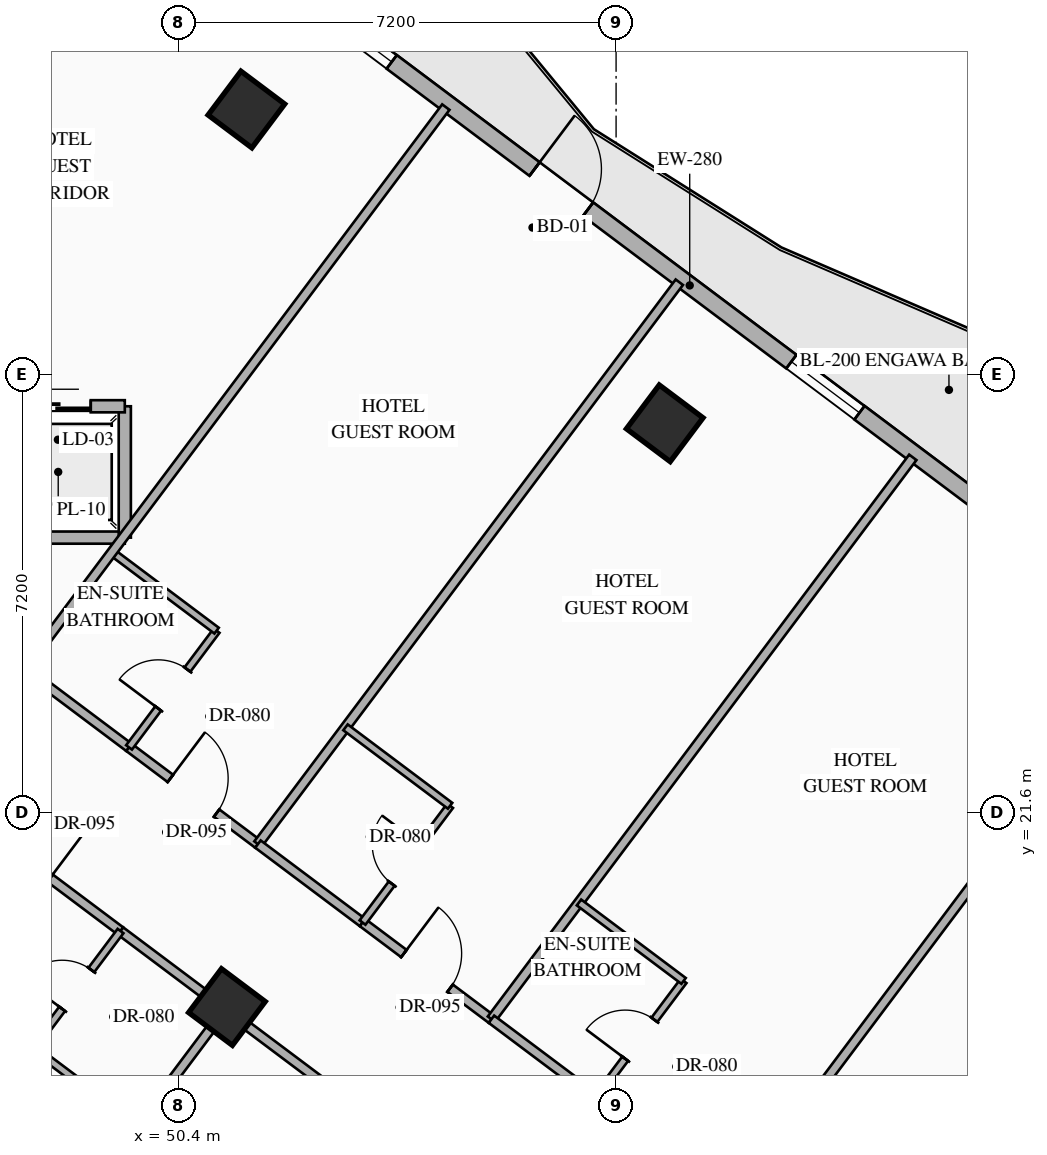
"""IFC4 building model, lengths in metres.
Left out: names, types, materials, properties, quantities, classifications, styles, units other than length and angle.
Written with IfcOpenShell. Run it as: python <this file> out.ifc"""

import sys

from ifc_helpers import new_model, si_unit, direction, frame, frame_2d, origin, origin_2d, place, context, subcontext, project, spatial, rectangle, hollow_rectangle, extrude, element, fill, save


model = new_model("IFC4")
c1 = context("Model", 3, precision=1e-05, world=origin(), true_north=direction((0.0, 1.0)))
c2 = subcontext(c1, "Body", "Model", "MODEL_VIEW")
j1 = project(units=[si_unit("LENGTHUNIT", "METRE"), si_unit("PLANEANGLEUNIT", "RADIAN")], contexts=[c1])
p1 = place(None, origin())
s1 = spatial("IfcSite", under=j1, at=p1, CompositionType="ELEMENT")
p2 = place(p1, origin())
s2 = spatial("IfcBuilding", under=s1, at=p2, CompositionType="ELEMENT")
p3 = place(p2, frame((0.0, 0.0, 74.6)))
s3 = spatial("IfcBuildingStorey", under=s2, at=p3, CompositionType="ELEMENT", Elevation=74.6)
for number, where, z_axis, x_axis in (
    (1, (51.52, 33.16, 0.0), (0.0, 0.0, 1.0), (0.8, -0.6, 0.0)),
    (2, (58.4, 28.0, 0.0), (0.0, 0.0, 1.0), (0.8, -0.6, 0.0)),
    (3, (51.2, 18.4, 0.0), (0.0, 0.0, 1.0), (0.8, -0.6, 0.0)),
):
    element("IfcColumn", number, at=place(p3, frame(where, z_axis=z_axis, x_axis=x_axis)), inside=s3, PredefinedType="COLUMN", context=c2, shape_type="SweptSolid", body=[
        extrude(hollow_rectangle(XDim=0.9, YDim=0.9, WallThickness=0.036, at=origin_2d()), origin(), (0.0, 0.0, 1.0), 3.35),
    ])
p4 = place(p3, frame((44.86, 40.73, 0.0), z_axis=(0.0, 0.0, 1.0), x_axis=(0.800006902154, -0.599990797017, 0.0)))
e4 = element("IfcWall", 4, at=p4, inside=s3, PredefinedType="STANDARD", context=c2, shape_type="SweptSolid", body=[
    extrude(rectangle(XDim=29.712, YDim=0.28, at=frame_2d((14.856, 0.0))), origin(), (0.0, 0.0, 1.0), 3.13),
])
p5 = place(p4, frame((14.249, 0.0, 0.0)))
e5 = element("IfcOpeningElement", 5, at=p5, cuts=e4, PredefinedType="OPENING", context=c2, shape_type="SweptSolid", body=[
    extrude(rectangle(XDim=1.1, YDim=2.2, at=frame_2d((0.55, 1.1))), frame((0.0, 0.15, 0.0), z_axis=(0.0, -1.0, 0.0), x_axis=(1.0, 0.0, 0.0)), (0.0, 0.0, 1.0), 0.3),
])
p6 = place(p4, frame((1.612, 0.0, 0.85)))
e6 = element("IfcOpeningElement", 6, at=p6, cuts=e4, PredefinedType="OPENING", context=c2, shape_type="SweptSolid", body=[
    extrude(rectangle(XDim=1.4, YDim=1.8, at=frame_2d((0.7, 0.9))), frame((0.0, 0.15, 0.0), z_axis=(0.0, -1.0, 0.0), x_axis=(1.0, 0.0, 0.0)), (0.0, 0.0, 1.0), 0.3),
])
p7 = place(p4, frame((5.667, 0.0, 0.85)))
e7 = element("IfcOpeningElement", 7, at=p7, cuts=e4, PredefinedType="OPENING", context=c2, shape_type="SweptSolid", body=[
    extrude(rectangle(XDim=1.4, YDim=1.8, at=frame_2d((0.7, 0.9))), frame((0.0, 0.15, 0.0), z_axis=(0.0, -1.0, 0.0), x_axis=(1.0, 0.0, 0.0)), (0.0, 0.0, 1.0), 0.3),
])
p8 = place(p4, frame((9.912, 0.0, 0.85)))
e8 = element("IfcOpeningElement", 8, at=p8, cuts=e4, PredefinedType="OPENING", context=c2, shape_type="SweptSolid", body=[
    extrude(rectangle(XDim=1.4, YDim=1.8, at=frame_2d((0.7, 0.9))), frame((0.0, 0.15, 0.0), z_axis=(0.0, -1.0, 0.0), x_axis=(1.0, 0.0, 0.0)), (0.0, 0.0, 1.0), 0.3),
])
p9 = place(p4, frame((19.528, 0.0, 0.85)))
e9 = element("IfcOpeningElement", 9, at=p9, cuts=e4, PredefinedType="OPENING", context=c2, shape_type="SweptSolid", body=[
    extrude(rectangle(XDim=1.4, YDim=1.8, at=frame_2d((0.7, 0.9))), frame((0.0, 0.15, 0.0), z_axis=(0.0, -1.0, 0.0), x_axis=(1.0, 0.0, 0.0)), (0.0, 0.0, 1.0), 0.3),
])
p10 = place(p4, frame((23.451, 0.0, 0.85)))
e10 = element("IfcOpeningElement", 10, at=p10, cuts=e4, PredefinedType="OPENING", context=c2, shape_type="SweptSolid", body=[
    extrude(rectangle(XDim=1.4, YDim=1.8, at=frame_2d((0.7, 0.9))), frame((0.0, 0.15, 0.0), z_axis=(0.0, -1.0, 0.0), x_axis=(1.0, 0.0, 0.0)), (0.0, 0.0, 1.0), 0.3),
])
p11 = place(p4, frame((27.852, 0.0, 0.85)))
e11 = element("IfcOpeningElement", 11, at=p11, cuts=e4, PredefinedType="OPENING", context=c2, shape_type="SweptSolid", body=[
    extrude(rectangle(XDim=1.4, YDim=1.8, at=frame_2d((0.7, 0.9))), frame((0.0, 0.15, 0.0), z_axis=(0.0, -1.0, 0.0), x_axis=(1.0, 0.0, 0.0)), (0.0, 0.0, 1.0), 0.3),
])
p12 = place(p3, frame((53.318, 2.487, 0.0), z_axis=(0.0, 0.0, 1.0), x_axis=(-0.800004174678, 0.599994433723, 0.0)))
e12 = element("IfcWall", 12, at=p12, inside=s3, PredefinedType="STANDARD", context=c2, shape_type="SweptSolid", body=[
    extrude(rectangle(XDim=35.089, YDim=0.28, at=frame_2d((17.544, 0.0))), origin(), (0.0, 0.0, 1.0), 3.13),
])
p13 = place(p12, frame((1.931, 0.0, 0.85)))
e13 = element("IfcOpeningElement", 13, at=p13, cuts=e12, PredefinedType="OPENING", context=c2, shape_type="SweptSolid", body=[
    extrude(rectangle(XDim=1.4, YDim=1.8, at=frame_2d((0.7, 0.9))), frame((0.0, 0.15, 0.0), z_axis=(0.0, -1.0, 0.0), x_axis=(1.0, 0.0, 0.0)), (0.0, 0.0, 1.0), 0.3),
])
p14 = place(p12, frame((6.819, 0.0, 0.85)))
e14 = element("IfcOpeningElement", 14, at=p14, cuts=e12, PredefinedType="OPENING", context=c2, shape_type="SweptSolid", body=[
    extrude(rectangle(XDim=1.4, YDim=1.8, at=frame_2d((0.7, 0.9))), frame((0.0, 0.15, 0.0), z_axis=(0.0, -1.0, 0.0), x_axis=(1.0, 0.0, 0.0)), (0.0, 0.0, 1.0), 0.3),
])
p15 = place(p12, frame((11.832, 0.0, 0.85)))
e15 = element("IfcOpeningElement", 15, at=p15, cuts=e12, PredefinedType="OPENING", context=c2, shape_type="SweptSolid", body=[
    extrude(rectangle(XDim=1.4, YDim=1.8, at=frame_2d((0.7, 0.9))), frame((0.0, 0.15, 0.0), z_axis=(0.0, -1.0, 0.0), x_axis=(1.0, 0.0, 0.0)), (0.0, 0.0, 1.0), 0.3),
])
p16 = place(p12, frame((17.647, 0.0, 0.85)))
e16 = element("IfcOpeningElement", 16, at=p16, cuts=e12, PredefinedType="OPENING", context=c2, shape_type="SweptSolid", body=[
    extrude(rectangle(XDim=1.4, YDim=1.8, at=frame_2d((0.7, 0.9))), frame((0.0, 0.15, 0.0), z_axis=(0.0, -1.0, 0.0), x_axis=(1.0, 0.0, 0.0)), (0.0, 0.0, 1.0), 0.3),
])
p17 = place(p12, frame((21.857, 0.0, 0.85)))
e17 = element("IfcOpeningElement", 17, at=p17, cuts=e12, PredefinedType="OPENING", context=c2, shape_type="SweptSolid", body=[
    extrude(rectangle(XDim=1.4, YDim=1.8, at=frame_2d((0.7, 0.9))), frame((0.0, 0.15, 0.0), z_axis=(0.0, -1.0, 0.0), x_axis=(1.0, 0.0, 0.0)), (0.0, 0.0, 1.0), 0.3),
])
p18 = place(p12, frame((26.87, 0.0, 0.85)))
e18 = element("IfcOpeningElement", 18, at=p18, cuts=e12, PredefinedType="OPENING", context=c2, shape_type="SweptSolid", body=[
    extrude(rectangle(XDim=1.4, YDim=1.8, at=frame_2d((0.7, 0.9))), frame((0.0, 0.15, 0.0), z_axis=(0.0, -1.0, 0.0), x_axis=(1.0, 0.0, 0.0)), (0.0, 0.0, 1.0), 0.3),
])
p19 = place(p12, frame((31.757, 0.0, 0.85)))
e19 = element("IfcOpeningElement", 19, at=p19, cuts=e12, PredefinedType="OPENING", context=c2, shape_type="SweptSolid", body=[
    extrude(rectangle(XDim=1.4, YDim=1.8, at=frame_2d((0.7, 0.9))), frame((0.0, 0.15, 0.0), z_axis=(0.0, -1.0, 0.0), x_axis=(1.0, 0.0, 0.0)), (0.0, 0.0, 1.0), 0.3),
])
p20 = place(p3, frame((45.12, 26.12, 0.0), z_axis=(0.0, 0.0, 1.0), x_axis=(1.0, 0.0, 0.0)))
e20 = element("IfcWall", 20, at=p20, inside=s3, PredefinedType="STANDARD", context=c2, shape_type="SweptSolid", body=[
    extrude(rectangle(XDim=4.4, YDim=0.2, at=frame_2d((2.2, 0.0))), origin(), (0.0, 0.0, 1.0), 3.13),
])
p21 = place(p3, frame((49.52, 26.12, 0.0), z_axis=(0.0, 0.0, 1.0), x_axis=(0.0, 1.0, 0.0)))
e21 = element("IfcWall", 21, at=p21, inside=s3, PredefinedType="STANDARD", context=c2, shape_type="SweptSolid", body=[
    extrude(rectangle(XDim=2.16, YDim=0.2, at=frame_2d((1.08, 0.0))), origin(), (0.0, 0.0, 1.0), 3.13),
])
p22 = place(p3, frame((45.12, 28.28, 0.0), z_axis=(0.0, 0.0, 1.0), x_axis=(1.0, 0.0, 0.0)))
e22 = element("IfcWall", 22, at=p22, inside=s3, PredefinedType="STANDARD", context=c2, shape_type="SweptSolid", body=[
    extrude(rectangle(XDim=4.4, YDim=0.2, at=frame_2d((2.2, 0.0))), origin(), (0.0, 0.0, 1.0), 3.13),
])
p23 = place(p22, frame((0.56, 0.0, 0.0)))
e23 = element("IfcOpeningElement", 23, at=p23, cuts=e22, PredefinedType="OPENING", context=c2, shape_type="SweptSolid", body=[
    extrude(rectangle(XDim=1.08, YDim=2.15, at=frame_2d((0.54, 1.075))), frame((0.0, 0.11, 0.0), z_axis=(0.0, -1.0, 0.0), x_axis=(1.0, 0.0, 0.0)), (0.0, 0.0, 1.0), 0.22),
])
p24 = place(p22, frame((2.76, 0.0, 0.0)))
e24 = element("IfcOpeningElement", 24, at=p24, cuts=e22, PredefinedType="OPENING", context=c2, shape_type="SweptSolid", body=[
    extrude(rectangle(XDim=1.08, YDim=2.15, at=frame_2d((0.54, 1.075))), frame((0.0, 0.11, 0.0), z_axis=(0.0, -1.0, 0.0), x_axis=(1.0, 0.0, 0.0)), (0.0, 0.0, 1.0), 0.22),
])
p25 = place(p3, frame((47.87, 23.96, 0.0), z_axis=(0.0, 0.0, 1.0), x_axis=(0.79998637334, -0.60001816845, 0.0)))
e25 = element("IfcWall", 25, at=p25, inside=s3, PredefinedType="PARTITIONING", context=c2, shape_type="SweptSolid", body=[
    extrude(rectangle(XDim=2.15, YDim=0.15, at=frame_2d((1.075, 0.0))), origin(), (0.0, 0.0, 1.0), 2.775),
])
p26 = place(p3, frame((49.59, 22.67, 0.0), z_axis=(0.0, 0.0, 1.0), x_axis=(0.800011056104, -0.599985258246, 0.0)))
e26 = element("IfcWall", 26, at=p26, inside=s3, PredefinedType="PARTITIONING", context=c2, shape_type="SweptSolid", body=[
    extrude(rectangle(XDim=2.65, YDim=0.15, at=frame_2d((1.325, 0.0))), origin(), (0.0, 0.0, 1.0), 2.775),
])
p27 = place(p26, frame((0.85, 0.0, 0.0)))
e27 = element("IfcOpeningElement", 27, at=p27, cuts=e26, PredefinedType="OPENING", context=c2, shape_type="SweptSolid", body=[
    extrude(rectangle(XDim=0.95, YDim=2.15, at=frame_2d((0.475, 1.075))), frame((0.0, 0.085, 0.0), z_axis=(0.0, -1.0, 0.0), x_axis=(1.0, 0.0, 0.0)), (0.0, 0.0, 1.0), 0.17),
])
p28 = place(p3, frame((49.59, 22.67, 0.0), z_axis=(0.0, 0.0, 1.0), x_axis=(0.599951172744, 0.800036618114, 0.0)))
e28 = element("IfcWall", 28, at=p28, inside=s3, PredefinedType="PARTITIONING", context=c2, shape_type="SweptSolid", body=[
    extrude(rectangle(XDim=2.4, YDim=0.12, at=frame_2d((1.2, 0.0))), origin(), (0.0, 0.0, 1.0), 3.13),
])
p29 = place(p28, frame((0.8, 0.0, 0.0)))
e29 = element("IfcOpeningElement", 29, at=p29, cuts=e28, PredefinedType="OPENING", context=c2, shape_type="SweptSolid", body=[
    extrude(rectangle(XDim=0.8, YDim=2.06, at=frame_2d((0.4, 1.03))), frame((0.0, 0.07, 0.0), z_axis=(0.0, -1.0, 0.0), x_axis=(1.0, 0.0, 0.0)), (0.0, 0.0, 1.0), 0.14),
])
p30 = place(p3, frame((49.31, 25.88, 0.0), z_axis=(0.0, 0.0, 1.0), x_axis=(0.800040880289, -0.59994548908, 0.0)))
e30 = element("IfcWall", 30, at=p30, inside=s3, PredefinedType="PARTITIONING", context=c2, shape_type="SweptSolid", body=[
    extrude(rectangle(XDim=2.15, YDim=0.12, at=frame_2d((1.075, 0.0))), origin(), (0.0, 0.0, 1.0), 3.13),
])
for number, where, z_axis, x_axis in (
    (31, (47.87, 23.96, 0.0), (0.0, 0.0, 1.0), (0.6, 0.8, 0.0)),
    (32, (51.71, 21.08, 0.0), (0.0, 0.0, 1.0), (0.6, 0.8, 0.0)),
):
    element("IfcWall", number, at=place(p3, frame(where, z_axis=z_axis, x_axis=x_axis)), inside=s3, PredefinedType="PARTITIONING", context=c2, shape_type="SweptSolid", body=[
        extrude(rectangle(XDim=11.55, YDim=0.15, at=frame_2d((5.775, 0.0))), origin(), (0.0, 0.0, 1.0), 3.13),
    ])
p31 = place(p3, frame((51.71, 21.08, 0.0), z_axis=(0.0, 0.0, 1.0), x_axis=(0.79998637334, -0.60001816845, 0.0)))
e33 = element("IfcWall", 33, at=p31, inside=s3, PredefinedType="PARTITIONING", context=c2, shape_type="SweptSolid", body=[
    extrude(rectangle(XDim=2.15, YDim=0.15, at=frame_2d((1.075, 0.0))), origin(), (0.0, 0.0, 1.0), 2.775),
])
p32 = place(p3, frame((53.43, 19.79, 0.0), z_axis=(0.0, 0.0, 1.0), x_axis=(0.8, -0.6, 0.0)))
e34 = element("IfcWall", 34, at=p32, inside=s3, PredefinedType="PARTITIONING", context=c2, shape_type="SweptSolid", body=[
    extrude(rectangle(XDim=2.65, YDim=0.15, at=frame_2d((1.325, 0.0))), origin(), (0.0, 0.0, 1.0), 2.775),
])
p33 = place(p32, frame((0.85, 0.0, 0.0)))
e35 = element("IfcOpeningElement", 35, at=p33, cuts=e34, PredefinedType="OPENING", context=c2, shape_type="SweptSolid", body=[
    extrude(rectangle(XDim=0.95, YDim=2.15, at=frame_2d((0.475, 1.075))), frame((0.0, 0.085, 0.0), z_axis=(0.0, -1.0, 0.0), x_axis=(1.0, 0.0, 0.0)), (0.0, 0.0, 1.0), 0.17),
])
p34 = place(p3, frame((53.43, 19.79, 0.0), z_axis=(0.0, 0.0, 1.0), x_axis=(0.600065100855, 0.79995117022, 0.0)))
e36 = element("IfcWall", 36, at=p34, inside=s3, PredefinedType="PARTITIONING", context=c2, shape_type="SweptSolid", body=[
    extrude(rectangle(XDim=2.4, YDim=0.12, at=frame_2d((1.2, 0.0))), origin(), (0.0, 0.0, 1.0), 3.13),
])
p35 = place(p34, frame((0.8, 0.0, 0.0)))
e37 = element("IfcOpeningElement", 37, at=p35, cuts=e36, PredefinedType="OPENING", context=c2, shape_type="SweptSolid", body=[
    extrude(rectangle(XDim=0.8, YDim=2.06, at=frame_2d((0.4, 1.03))), frame((0.0, 0.07, 0.0), z_axis=(0.0, -1.0, 0.0), x_axis=(1.0, 0.0, 0.0)), (0.0, 0.0, 1.0), 0.14),
])
p36 = place(p3, frame((53.15, 23.0, 0.0), z_axis=(0.0, 0.0, 1.0), x_axis=(0.800027249606, -0.599963665473, 0.0)))
e38 = element("IfcWall", 38, at=p36, inside=s3, PredefinedType="PARTITIONING", context=c2, shape_type="SweptSolid", body=[
    extrude(rectangle(XDim=2.15, YDim=0.12, at=frame_2d((1.075, 0.0))), origin(), (0.0, 0.0, 1.0), 3.13),
])
p37 = place(p3, frame((55.55, 18.2, 0.0), z_axis=(0.0, 0.0, 1.0), x_axis=(0.599996617946, 0.80000253653, 0.0)))
e39 = element("IfcWall", 39, at=p37, inside=s3, PredefinedType="PARTITIONING", context=c2, shape_type="SweptSolid", body=[
    extrude(rectangle(XDim=11.55, YDim=0.15, at=frame_2d((5.775, 0.0))), origin(), (0.0, 0.0, 1.0), 3.13),
])
p38 = place(p3, frame((55.55, 18.2, 0.0), z_axis=(0.0, 0.0, 1.0), x_axis=(0.79998637334, -0.60001816845, 0.0)))
e40 = element("IfcWall", 40, at=p38, inside=s3, PredefinedType="PARTITIONING", context=c2, shape_type="SweptSolid", body=[
    extrude(rectangle(XDim=2.15, YDim=0.15, at=frame_2d((1.075, 0.0))), origin(), (0.0, 0.0, 1.0), 2.775),
])
p39 = place(p3, frame((57.27, 16.91, 0.0), z_axis=(0.0, 0.0, 1.0), x_axis=(0.599951172744, 0.800036618114, 0.0)))
e41 = element("IfcWall", 41, at=p39, inside=s3, PredefinedType="PARTITIONING", context=c2, shape_type="SweptSolid", body=[
    extrude(rectangle(XDim=2.4, YDim=0.12, at=frame_2d((1.2, 0.0))), origin(), (0.0, 0.0, 1.0), 3.13),
])
p40 = place(p39, frame((0.8, 0.0, 0.0)))
e42 = element("IfcOpeningElement", 42, at=p40, cuts=e41, PredefinedType="OPENING", context=c2, shape_type="SweptSolid", body=[
    extrude(rectangle(XDim=0.8, YDim=2.06, at=frame_2d((0.4, 1.03))), frame((0.0, 0.07, 0.0), z_axis=(0.0, -1.0, 0.0), x_axis=(1.0, 0.0, 0.0)), (0.0, 0.0, 1.0), 0.14),
])
p41 = place(p3, frame((56.99, 20.12, 0.0), z_axis=(0.0, 0.0, 1.0), x_axis=(0.79998637334, -0.60001816845, 0.0)))
e43 = element("IfcWall", 43, at=p41, inside=s3, PredefinedType="PARTITIONING", context=c2, shape_type="SweptSolid", body=[
    extrude(rectangle(XDim=2.15, YDim=0.12, at=frame_2d((1.075, 0.0))), origin(), (0.0, 0.0, 1.0), 3.13),
])
p42 = place(p3, frame((59.55, 15.2, 0.0), z_axis=(0.0, 0.0, 1.0), x_axis=(0.599996617946, 0.80000253653, 0.0)))
e44 = element("IfcWall", 44, at=p42, inside=s3, PredefinedType="PARTITIONING", context=c2, shape_type="SweptSolid", body=[
    extrude(rectangle(XDim=11.55, YDim=0.15, at=frame_2d((5.775, 0.0))), origin(), (0.0, 0.0, 1.0), 3.13),
])
p43 = place(p3, frame((46.37, 21.96, 0.0), z_axis=(0.0, 0.0, 1.0), x_axis=(0.799977170108, -0.600030438649, 0.0)))
e45 = element("IfcWall", 45, at=p43, inside=s3, PredefinedType="PARTITIONING", context=c2, shape_type="SweptSolid", body=[
    extrude(rectangle(XDim=3.85, YDim=0.15, at=frame_2d((1.925, 0.0))), origin(), (0.0, 0.0, 1.0), 2.425),
])
p44 = place(p43, frame((1.45, 0.0, 0.0)))
e46 = element("IfcOpeningElement", 46, at=p44, cuts=e45, PredefinedType="OPENING", context=c2, shape_type="SweptSolid", body=[
    extrude(rectangle(XDim=0.95, YDim=2.15, at=frame_2d((0.475, 1.075))), frame((0.0, 0.085, 0.0), z_axis=(0.0, -1.0, 0.0), x_axis=(1.0, 0.0, 0.0)), (0.0, 0.0, 1.0), 0.17),
])
p45 = place(p3, frame((49.45, 19.65, 0.0), z_axis=(0.0, 0.0, 1.0), x_axis=(0.800040880289, -0.59994548908, 0.0)))
e47 = element("IfcWall", 47, at=p45, inside=s3, PredefinedType="PARTITIONING", context=c2, shape_type="SweptSolid", body=[
    extrude(rectangle(XDim=2.15, YDim=0.15, at=frame_2d((1.075, 0.0))), origin(), (0.0, 0.0, 1.0), 2.425),
])
p46 = place(p3, frame((48.01, 17.73, 0.0), z_axis=(0.0, 0.0, 1.0), x_axis=(0.6, 0.8, 0.0)))
e48 = element("IfcWall", 48, at=p46, inside=s3, PredefinedType="PARTITIONING", context=c2, shape_type="SweptSolid", body=[
    extrude(rectangle(XDim=2.4, YDim=0.12, at=frame_2d((1.2, 0.0))), origin(), (0.0, 0.0, 1.0), 3.13),
])
p47 = place(p46, frame((0.8, 0.0, 0.0)))
e49 = element("IfcOpeningElement", 49, at=p47, cuts=e48, PredefinedType="OPENING", context=c2, shape_type="SweptSolid", body=[
    extrude(rectangle(XDim=0.8, YDim=2.06, at=frame_2d((0.4, 1.03))), frame((0.0, 0.07, 0.0), z_axis=(0.0, -1.0, 0.0), x_axis=(1.0, 0.0, 0.0)), (0.0, 0.0, 1.0), 0.14),
])
p48 = place(p3, frame((48.01, 17.73, 0.0), z_axis=(0.0, 0.0, 1.0), x_axis=(0.79998637334, -0.60001816845, 0.0)))
e50 = element("IfcWall", 50, at=p48, inside=s3, PredefinedType="PARTITIONING", context=c2, shape_type="SweptSolid", body=[
    extrude(rectangle(XDim=2.15, YDim=0.12, at=frame_2d((1.075, 0.0))), origin(), (0.0, 0.0, 1.0), 3.13),
])
p49 = place(p3, frame((44.36, 9.28, 0.0), z_axis=(0.0, 0.0, 1.0), x_axis=(0.599986233332, 0.800010324816, 0.0)))
e51 = element("IfcWall", 51, at=p49, inside=s3, PredefinedType="PARTITIONING", context=c2, shape_type="SweptSolid", body=[
    extrude(rectangle(XDim=11.35, YDim=0.15, at=frame_2d((5.675, 0.0))), origin(), (0.0, 0.0, 1.0), 2.425),
])
p50 = place(p3, frame((51.17, 18.36, 0.0), z_axis=(0.0, 0.0, 1.0), x_axis=(0.79998637334, -0.60001816845, 0.0)))
e52 = element("IfcWall", 52, at=p50, inside=s3, PredefinedType="PARTITIONING", context=c2, shape_type="SweptSolid", body=[
    extrude(rectangle(XDim=2.15, YDim=0.15, at=frame_2d((1.075, 0.0))), origin(), (0.0, 0.0, 1.0), 2.425),
])
p51 = place(p5, origin())
e53 = element("IfcDoor", 53, at=p51, inside=s3, OperationType="SINGLE_SWING_LEFT", PredefinedType="DOOR", context=c2, shape_type="SweptSolid", body=[
    extrude(rectangle(XDim=1.1, YDim=2.2, at=frame_2d((0.55, 1.1))), frame((0.0, 0.025, 0.0), z_axis=(0.0, -1.0, 0.0), x_axis=(1.0, 0.0, 0.0)), (0.0, 0.0, 1.0), 0.05),
])
fill(e5, e53)
p52 = place(p8, origin())
e54 = element("IfcWindow", 54, at=p52, inside=s3, PartitioningType="SINGLE_PANEL", PredefinedType="WINDOW", context=c2, shape_type="SweptSolid", body=[
    extrude(rectangle(XDim=1.4, YDim=1.8, at=frame_2d((0.7, 0.9))), frame((0.0, 0.03, 0.0), z_axis=(0.0, -1.0, 0.0), x_axis=(1.0, 0.0, 0.0)), (0.0, 0.0, 1.0), 0.06),
])
fill(e8, e54)
p53 = place(p9, origin())
e55 = element("IfcWindow", 55, at=p53, inside=s3, PartitioningType="SINGLE_PANEL", PredefinedType="WINDOW", context=c2, shape_type="SweptSolid", body=[
    extrude(rectangle(XDim=1.4, YDim=1.8, at=frame_2d((0.7, 0.9))), frame((0.0, 0.03, 0.0), z_axis=(0.0, -1.0, 0.0), x_axis=(1.0, 0.0, 0.0)), (0.0, 0.0, 1.0), 0.06),
])
fill(e9, e55)
p54 = place(p24, origin())
e56 = element("IfcDoor", 56, at=p54, inside=s3, OperationType="SLIDING_TO_LEFT", PredefinedType="USERDEFINED", context=c2, shape_type="SweptSolid", body=[
    extrude(rectangle(XDim=1.08, YDim=2.15, at=frame_2d((0.54, 1.075))), frame((0.0, 0.025, 0.0), z_axis=(0.0, -1.0, 0.0), x_axis=(1.0, 0.0, 0.0)), (0.0, 0.0, 1.0), 0.05),
])
fill(e24, e56)
p55 = place(p27, origin())
e57 = element("IfcDoor", 57, at=p55, inside=s3, OperationType="SINGLE_SWING_LEFT", PredefinedType="DOOR", context=c2, shape_type="SweptSolid", body=[
    extrude(rectangle(XDim=0.95, YDim=2.15, at=frame_2d((0.475, 1.075))), frame((0.0, 0.025, 0.0), z_axis=(0.0, -1.0, 0.0), x_axis=(1.0, 0.0, 0.0)), (0.0, 0.0, 1.0), 0.05),
])
fill(e27, e57)
p56 = place(p29, origin())
e58 = element("IfcDoor", 58, at=p56, inside=s3, OperationType="SINGLE_SWING_LEFT", PredefinedType="DOOR", context=c2, shape_type="SweptSolid", body=[
    extrude(rectangle(XDim=0.8, YDim=2.06, at=frame_2d((0.4, 1.03))), frame((0.0, 0.025, 0.0), z_axis=(0.0, -1.0, 0.0), x_axis=(1.0, 0.0, 0.0)), (0.0, 0.0, 1.0), 0.05),
])
fill(e29, e58)
p57 = place(p33, origin())
e59 = element("IfcDoor", 59, at=p57, inside=s3, OperationType="SINGLE_SWING_LEFT", PredefinedType="DOOR", context=c2, shape_type="SweptSolid", body=[
    extrude(rectangle(XDim=0.95, YDim=2.15, at=frame_2d((0.475, 1.075))), frame((0.0, 0.025, 0.0), z_axis=(0.0, -1.0, 0.0), x_axis=(1.0, 0.0, 0.0)), (0.0, 0.0, 1.0), 0.05),
])
fill(e35, e59)
p58 = place(p35, origin())
e60 = element("IfcDoor", 60, at=p58, inside=s3, OperationType="SINGLE_SWING_RIGHT", PredefinedType="DOOR", context=c2, shape_type="SweptSolid", body=[
    extrude(rectangle(XDim=0.8, YDim=2.06, at=frame_2d((0.4, 1.03))), frame((0.0, 0.025, 0.0), z_axis=(0.0, -1.0, 0.0), x_axis=(1.0, 0.0, 0.0)), (0.0, 0.0, 1.0), 0.05),
])
fill(e37, e60)
p59 = place(p40, origin())
e61 = element("IfcDoor", 61, at=p59, inside=s3, OperationType="SINGLE_SWING_LEFT", PredefinedType="DOOR", context=c2, shape_type="SweptSolid", body=[
    extrude(rectangle(XDim=0.8, YDim=2.06, at=frame_2d((0.4, 1.03))), frame((0.0, 0.025, 0.0), z_axis=(0.0, -1.0, 0.0), x_axis=(1.0, 0.0, 0.0)), (0.0, 0.0, 1.0), 0.05),
])
fill(e42, e61)
p60 = place(p47, origin())
e62 = element("IfcDoor", 62, at=p60, inside=s3, OperationType="SINGLE_SWING_LEFT", PredefinedType="DOOR", context=c2, shape_type="SweptSolid", body=[
    extrude(rectangle(XDim=0.8, YDim=2.06, at=frame_2d((0.4, 1.03))), frame((0.0, 0.025, 0.0), z_axis=(0.0, -1.0, 0.0), x_axis=(1.0, 0.0, 0.0)), (0.0, 0.0, 1.0), 0.05),
])
fill(e49, e62)
save(model, sys.argv[1])
